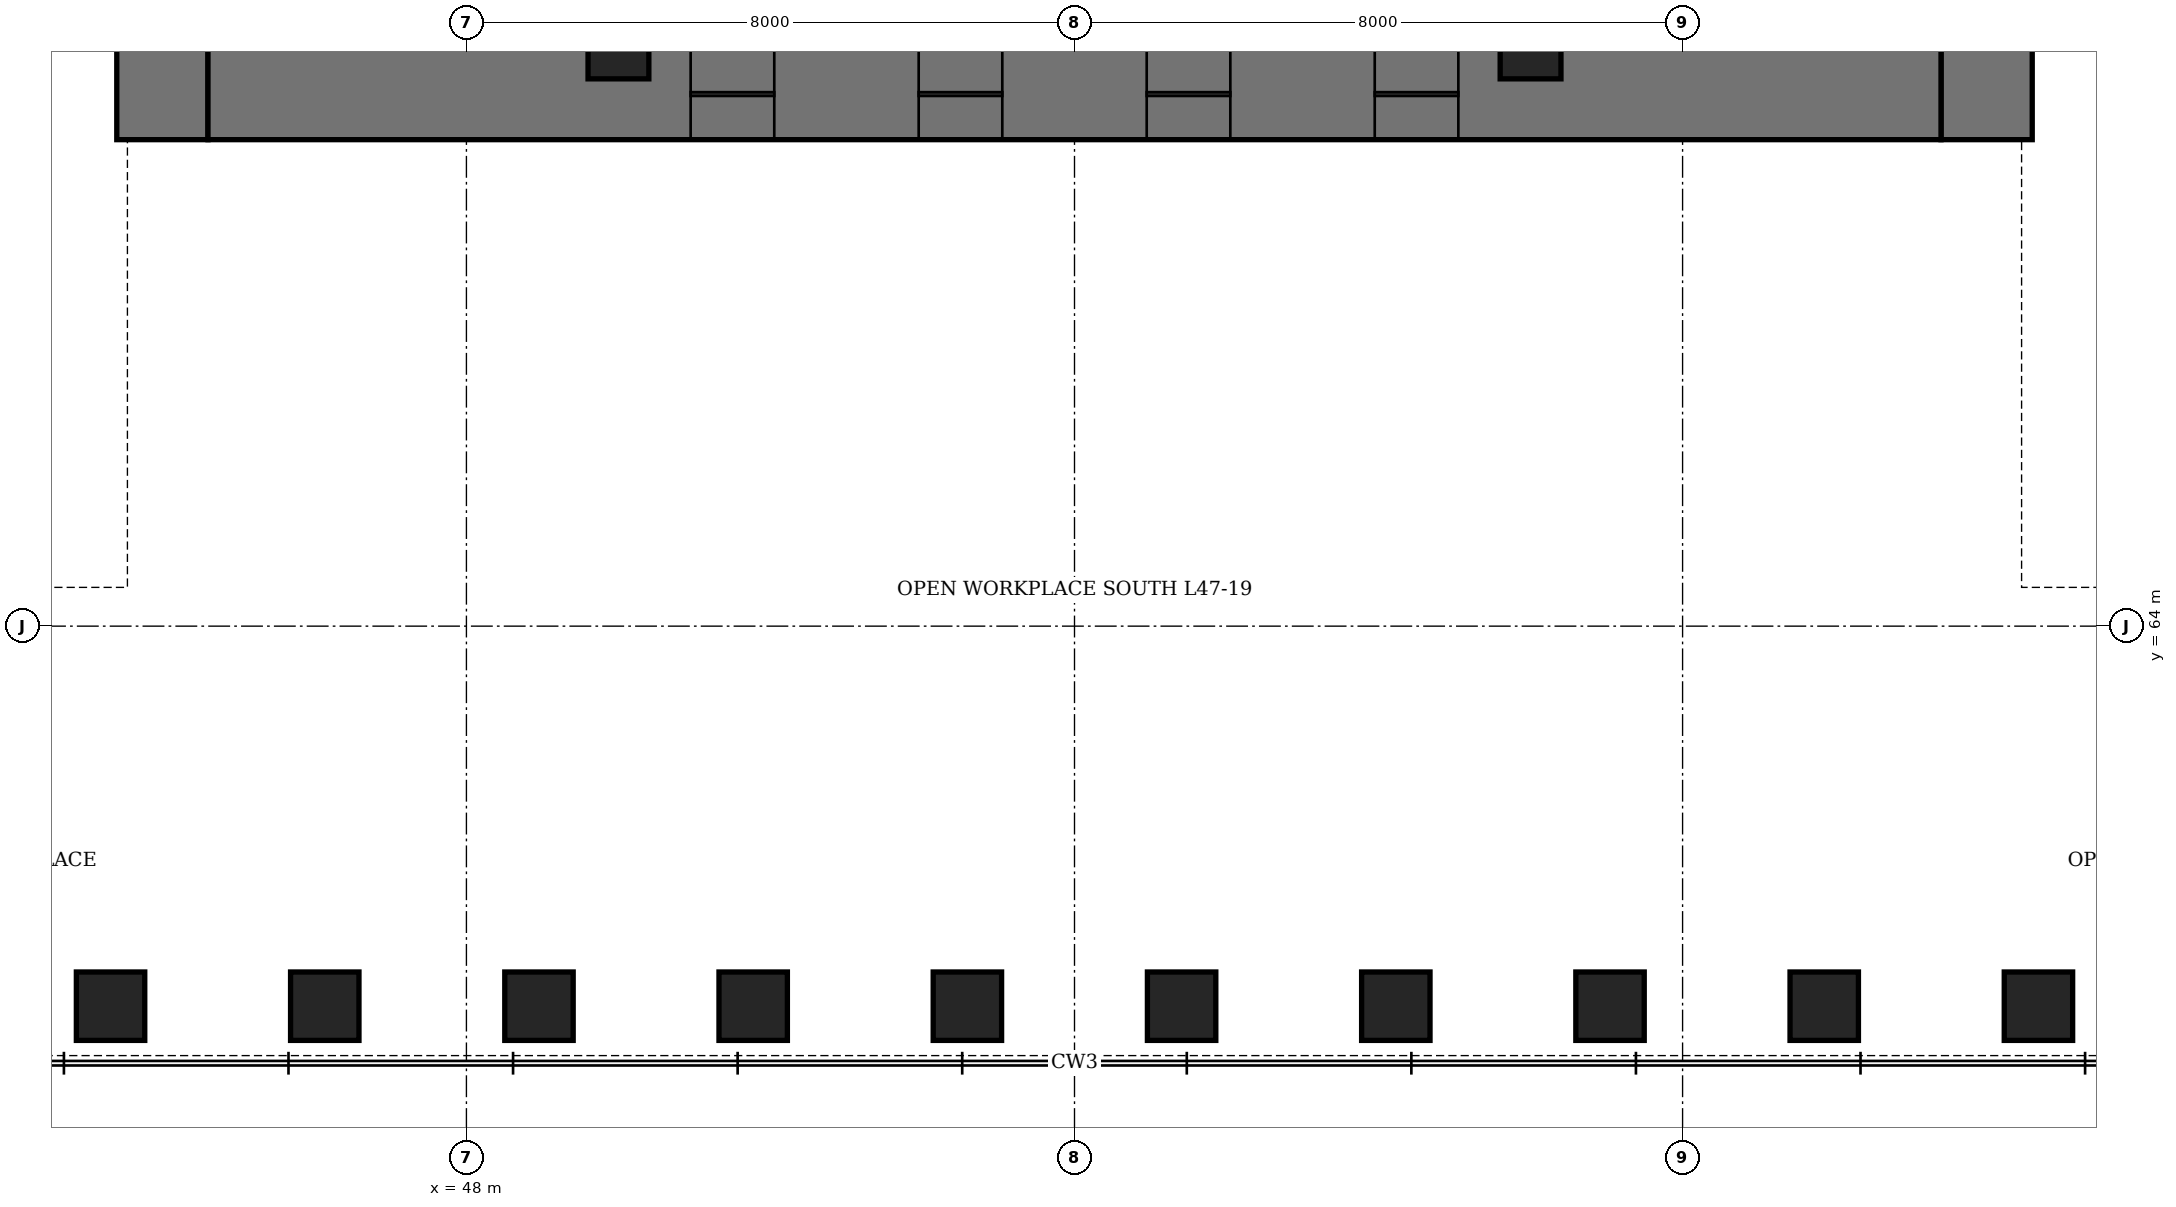
"""IFC4 building model, lengths in metres.
Left out: names, types, materials, properties, quantities, classifications, styles, units other than length and angle.
Written with IfcOpenShell. Run it as: python <this file> out.ifc"""

import sys

from ifc_helpers import new_model, si_unit, direction, frame, frame_2d, origin, origin_2d, place, context, subcontext, project, spatial, rectangle, hollow_rectangle, extrude, element, fill, save


model = new_model("IFC4")
c1 = context("Model", 3, precision=1e-05, world=origin(), true_north=direction((0.0, 1.0)))
c2 = subcontext(c1, "Body", "Model", "MODEL_VIEW")
j1 = project(units=[si_unit("LENGTHUNIT", "METRE"), si_unit("PLANEANGLEUNIT", "RADIAN")], contexts=[c1])
p1 = place(None, origin())
s1 = spatial("IfcSite", under=j1, at=p1, CompositionType="ELEMENT")
p2 = place(p1, origin())
s2 = spatial("IfcBuilding", under=s1, at=p2, CompositionType="ELEMENT")
p3 = place(p2, frame((0.0, 0.0, 210.7)))
s3 = spatial("IfcBuildingStorey", under=s2, at=p3, CompositionType="ELEMENT", Elevation=210.7)
for number, where, z_axis, x_axis in (
    (1, (43.318, 59.0, 0.0), (0.0, 0.0, 1.0), (1.0, 0.0, 0.0)),
    (2, (46.136, 59.0, 0.0), (0.0, 0.0, 1.0), (1.0, 0.0, 0.0)),
    (3, (48.955, 59.0, 0.0), (0.0, 0.0, 1.0), (1.0, 0.0, 0.0)),
    (4, (51.773, 59.0, 0.0), (0.0, 0.0, 1.0), (1.0, 0.0, 0.0)),
    (5, (54.591, 59.0, 0.0), (0.0, 0.0, 1.0), (1.0, 0.0, 0.0)),
    (6, (57.409, 59.0, 0.0), (0.0, 0.0, 1.0), (1.0, 0.0, 0.0)),
    (7, (60.227, 59.0, 0.0), (0.0, 0.0, 1.0), (1.0, 0.0, 0.0)),
    (8, (63.045, 59.0, 0.0), (0.0, 0.0, 1.0), (1.0, 0.0, 0.0)),
    (9, (65.864, 59.0, 0.0), (0.0, 0.0, 1.0), (1.0, 0.0, 0.0)),
    (10, (68.682, 59.0, 0.0), (0.0, 0.0, 1.0), (1.0, 0.0, 0.0)),
):
    element("IfcColumn", number, at=place(p3, frame(where, z_axis=z_axis, x_axis=x_axis)), inside=s3, PredefinedType="COLUMN", context=c2, shape_type="SweptSolid", body=[
        extrude(hollow_rectangle(XDim=0.9, YDim=0.9, WallThickness=0.12, at=origin_2d()), origin(), (0.0, 0.0, 1.0), 4.2),
    ])
p4 = place(p3, frame((44.0, 70.4, 0.0), z_axis=(0.0, 0.0, 1.0), x_axis=(0.0, 1.0, 0.0)))
e11 = element("IfcWall", 11, at=p4, inside=s3, PredefinedType="SHEAR", context=c2, shape_type="SweptSolid", body=[
    extrude(rectangle(XDim=19.2, YDim=1.2, at=frame_2d((9.6, 0.0))), origin(), (0.0, 0.0, 1.0), 4.2),
])
p5 = place(p4, frame((8.6, 0.0, 0.0)))
e12 = element("IfcOpeningElement", 12, at=p5, cuts=e11, PredefinedType="OPENING", context=c2, shape_type="SweptSolid", body=[
    extrude(rectangle(XDim=2.0, YDim=2.4, at=frame_2d((1.0, 1.2))), frame((0.0, 0.61, 0.0), z_axis=(0.0, -1.0, 0.0), x_axis=(1.0, 0.0, 0.0)), (0.0, 0.0, 1.0), 1.22),
])
p6 = place(p3, frame((68.0, 70.4, 0.0), z_axis=(0.0, 0.0, 1.0), x_axis=(0.0, 1.0, 0.0)))
e13 = element("IfcWall", 13, at=p6, inside=s3, PredefinedType="SHEAR", context=c2, shape_type="SweptSolid", body=[
    extrude(rectangle(XDim=19.2, YDim=1.2, at=frame_2d((9.6, 0.0))), origin(), (0.0, 0.0, 1.0), 4.2),
])
p7 = place(p6, frame((8.6, 0.0, 0.0)))
e14 = element("IfcOpeningElement", 14, at=p7, cuts=e13, PredefinedType="OPENING", context=c2, shape_type="SweptSolid", body=[
    extrude(rectangle(XDim=2.0, YDim=2.4, at=frame_2d((1.0, 1.2))), frame((0.0, 0.61, 0.0), z_axis=(0.0, -1.0, 0.0), x_axis=(1.0, 0.0, 0.0)), (0.0, 0.0, 1.0), 1.22),
])
p8 = place(p3, frame((44.6, 71.0, 0.0), z_axis=(0.0, 0.0, 1.0), x_axis=(1.0, 0.0, 0.0)))
e15 = element("IfcWall", 15, at=p8, inside=s3, PredefinedType="SHEAR", context=c2, shape_type="SweptSolid", body=[
    extrude(rectangle(XDim=22.8, YDim=1.2, at=frame_2d((11.4, 0.0))), origin(), (0.0, 0.0, 1.0), 4.2),
])
p9 = place(p8, frame((6.35, 0.0, 0.0)))
e16 = element("IfcOpeningElement", 16, at=p9, cuts=e15, PredefinedType="OPENING", context=c2, shape_type="SweptSolid", body=[
    extrude(rectangle(XDim=1.1, YDim=2.2, at=frame_2d((0.55, 1.1))), frame((0.0, 0.61, 0.0), z_axis=(0.0, -1.0, 0.0), x_axis=(1.0, 0.0, 0.0)), (0.0, 0.0, 1.0), 1.22),
])
p10 = place(p8, frame((9.35, 0.0, 0.0)))
e17 = element("IfcOpeningElement", 17, at=p10, cuts=e15, PredefinedType="OPENING", context=c2, shape_type="SweptSolid", body=[
    extrude(rectangle(XDim=1.1, YDim=2.2, at=frame_2d((0.55, 1.1))), frame((0.0, 0.61, 0.0), z_axis=(0.0, -1.0, 0.0), x_axis=(1.0, 0.0, 0.0)), (0.0, 0.0, 1.0), 1.22),
])
p11 = place(p8, frame((12.35, 0.0, 0.0)))
e18 = element("IfcOpeningElement", 18, at=p11, cuts=e15, PredefinedType="OPENING", context=c2, shape_type="SweptSolid", body=[
    extrude(rectangle(XDim=1.1, YDim=2.2, at=frame_2d((0.55, 1.1))), frame((0.0, 0.61, 0.0), z_axis=(0.0, -1.0, 0.0), x_axis=(1.0, 0.0, 0.0)), (0.0, 0.0, 1.0), 1.22),
])
p12 = place(p8, frame((15.35, 0.0, 0.0)))
e19 = element("IfcOpeningElement", 19, at=p12, cuts=e15, PredefinedType="OPENING", context=c2, shape_type="SweptSolid", body=[
    extrude(rectangle(XDim=1.1, YDim=2.2, at=frame_2d((0.55, 1.1))), frame((0.0, 0.61, 0.0), z_axis=(0.0, -1.0, 0.0), x_axis=(1.0, 0.0, 0.0)), (0.0, 0.0, 1.0), 1.22),
])
for number, where, z_axis, x_axis in (
    (20, (50.0, 71.6, 0.0), (0.0, 0.0, 1.0), (1.0, 0.0, 0.0)),
    (21, (62.0, 71.6, 0.0), (0.0, 0.0, 1.0), (1.0, 0.0, 0.0)),
):
    element("IfcColumn", number, at=place(p3, frame(where, z_axis=z_axis, x_axis=x_axis)), inside=s3, PredefinedType="COLUMN", context=c2, shape_type="SweptSolid", body=[
        extrude(hollow_rectangle(XDim=0.8, YDim=0.8, WallThickness=0.1, at=origin_2d()), origin(), (0.0, 0.0, 1.0), 4.2),
    ])
p13 = place(p9, origin())
e22 = element("IfcDoor", 22, at=p13, inside=s3, OperationType="SLIDING_TO_LEFT", PredefinedType="DOOR", context=c2, shape_type="SweptSolid", body=[
    extrude(rectangle(XDim=1.1, YDim=2.2, at=frame_2d((0.55, 1.1))), frame((0.0, 0.35, 0.0), z_axis=(0.0, -1.0, 0.0), x_axis=(1.0, 0.0, 0.0)), (0.0, 0.0, 1.0), 0.7),
])
fill(e16, e22)
p14 = place(p10, origin())
e23 = element("IfcDoor", 23, at=p14, inside=s3, OperationType="SLIDING_TO_LEFT", PredefinedType="DOOR", context=c2, shape_type="SweptSolid", body=[
    extrude(rectangle(XDim=1.1, YDim=2.2, at=frame_2d((0.55, 1.1))), frame((0.0, 0.35, 0.0), z_axis=(0.0, -1.0, 0.0), x_axis=(1.0, 0.0, 0.0)), (0.0, 0.0, 1.0), 0.7),
])
fill(e17, e23)
p15 = place(p11, origin())
e24 = element("IfcDoor", 24, at=p15, inside=s3, OperationType="SLIDING_TO_LEFT", PredefinedType="DOOR", context=c2, shape_type="SweptSolid", body=[
    extrude(rectangle(XDim=1.1, YDim=2.2, at=frame_2d((0.55, 1.1))), frame((0.0, 0.35, 0.0), z_axis=(0.0, -1.0, 0.0), x_axis=(1.0, 0.0, 0.0)), (0.0, 0.0, 1.0), 0.7),
])
fill(e18, e24)
p16 = place(p12, origin())
e25 = element("IfcDoor", 25, at=p16, inside=s3, OperationType="SLIDING_TO_LEFT", PredefinedType="DOOR", context=c2, shape_type="SweptSolid", body=[
    extrude(rectangle(XDim=1.1, YDim=2.2, at=frame_2d((0.55, 1.1))), frame((0.0, 0.35, 0.0), z_axis=(0.0, -1.0, 0.0), x_axis=(1.0, 0.0, 0.0)), (0.0, 0.0, 1.0), 0.7),
])
fill(e19, e25)
save(model, sys.argv[1])
